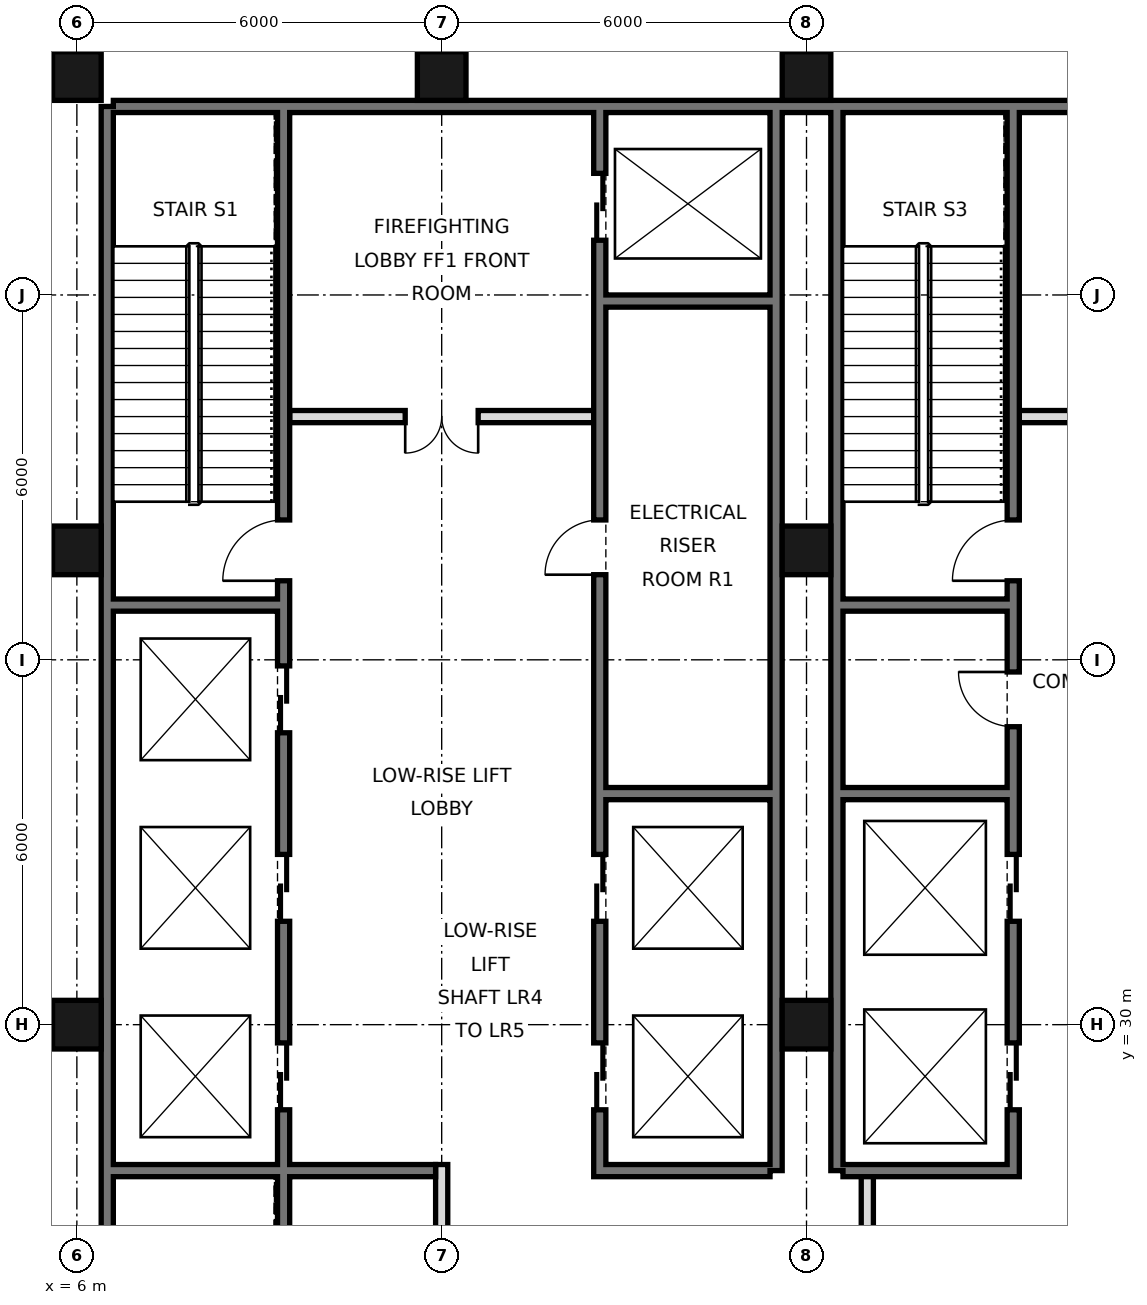
"""IFC4 building model, lengths in metres.
Left out: names, types, materials, properties, quantities, classifications, styles, units other than length and angle.
Written with IfcOpenShell. Run it as: python <this file> out.ifc"""

import sys

from ifc_helpers import new_model, si_unit, direction, frame, frame_2d, origin, origin_2d, place, context, subcontext, project, spatial, rectangle, hollow_rectangle, extrude, element, fill, save


model = new_model("IFC4")
c1 = context("Model", 3, precision=1e-05, world=origin(), true_north=direction((0.0, 1.0)))
c2 = subcontext(c1, "Body", "Model", "MODEL_VIEW")
j1 = project(units=[si_unit("LENGTHUNIT", "METRE"), si_unit("PLANEANGLEUNIT", "RADIAN")], contexts=[c1])
p1 = place(None, origin())
s1 = spatial("IfcSite", under=j1, at=p1, CompositionType="ELEMENT")
p2 = place(p1, origin())
s2 = spatial("IfcBuilding", under=s1, at=p2, CompositionType="ELEMENT")
p3 = place(p2, frame((0.0, 0.0, 161.8)))
s3 = spatial("IfcBuildingStorey", under=s2, at=p3, CompositionType="ELEMENT", Elevation=161.8)
for number, where, z_axis, x_axis in (
    (1, (6.0, 30.0, 0.0), (0.0, 0.0, 1.0), (1.0, 0.0, 0.0)),
    (2, (6.0, 37.8, 0.0), (0.0, 0.0, 1.0), (1.0, 0.0, 0.0)),
    (3, (6.0, 45.6, 0.0), (0.0, 0.0, 1.0), (1.0, 0.0, 0.0)),
    (4, (12.0, 45.6, 0.0), (0.0, 0.0, 1.0), (1.0, 0.0, 0.0)),
    (5, (18.0, 30.0, 0.0), (0.0, 0.0, 1.0), (1.0, 0.0, 0.0)),
    (6, (18.0, 37.8, 0.0), (0.0, 0.0, 1.0), (1.0, 0.0, 0.0)),
    (7, (18.0, 45.6, 0.0), (0.0, 0.0, 1.0), (1.0, 0.0, 0.0)),
):
    element("IfcColumn", number, at=place(p3, frame(where, z_axis=z_axis, x_axis=x_axis)), inside=s3, PredefinedType="COLUMN", context=c2, shape_type="SweptSolid", body=[
        extrude(hollow_rectangle(XDim=0.8, YDim=0.8, WallThickness=0.045, at=origin_2d()), origin(), (0.0, 0.0, 1.0), 5.4),
    ])
p4 = place(p3, frame((6.5, 21.6, 0.0), z_axis=(0.0, 0.0, 1.0), x_axis=(0.0, 1.0, 0.0)))
e8 = element("IfcWall", 8, at=p4, inside=s3, PredefinedType="SOLIDWALL", context=c2, shape_type="SweptSolid", body=[
    extrude(rectangle(XDim=23.5, YDim=0.2, at=frame_2d((11.75, 0.0))), origin(), (0.0, 0.0, 1.0), 5.22),
])
p5 = place(p3, frame((6.6, 45.1, 0.0), z_axis=(0.0, 0.0, 1.0), x_axis=(1.0, 0.0, 0.0)))
e9 = element("IfcWall", 9, at=p5, inside=s3, PredefinedType="SOLIDWALL", context=c2, shape_type="SweptSolid", body=[
    extrude(rectangle(XDim=34.8, YDim=0.2, at=frame_2d((17.4, 0.0))), origin(), (0.0, 0.0, 1.0), 5.22),
])
for number, where, z_axis, x_axis in (
    (10, (17.5, 27.6, 0.0), (0.0, 0.0, 1.0), (0.0, 1.0, 0.0)),
    (11, (18.5, 27.6, 0.0), (0.0, 0.0, 1.0), (0.0, 1.0, 0.0)),
):
    element("IfcWall", number, at=place(p3, frame(where, z_axis=z_axis, x_axis=x_axis)), inside=s3, PredefinedType="SOLIDWALL", context=c2, shape_type="SweptSolid", body=[
        extrude(rectangle(XDim=17.5, YDim=0.2, at=frame_2d((8.75, 0.0))), origin(), (0.0, 0.0, 1.0), 5.22),
    ])
p6 = place(p3, frame((19.0, 21.6, 0.0), z_axis=(0.0, 0.0, 1.0), x_axis=(0.0, 1.0, 0.0)))
e12 = element("IfcWall", 12, at=p6, inside=s3, PredefinedType="PARTITIONING", context=c2, shape_type="SweptSolid", body=[
    extrude(rectangle(XDim=6.0, YDim=0.2, at=frame_2d((3.0, 0.0))), origin(), (0.0, 0.0, 1.0), 5.22),
])
p7 = place(p6, frame((2.1, 0.0, 0.0)))
e13 = element("IfcOpeningElement", 13, at=p7, cuts=e12, PredefinedType="OPENING", context=c2, shape_type="SweptSolid", body=[
    extrude(rectangle(XDim=1.8, YDim=2.1, at=frame_2d((0.9, 1.05))), frame((0.0, 0.11, 0.0), z_axis=(0.0, -1.0, 0.0), x_axis=(1.0, 0.0, 0.0)), (0.0, 0.0, 1.0), 0.22),
])
p8 = place(p3, frame((12.0, 21.6, 0.0), z_axis=(0.0, 0.0, 1.0), x_axis=(0.0, 1.0, 0.0)))
e14 = element("IfcWall", 14, at=p8, inside=s3, PredefinedType="PARTITIONING", context=c2, shape_type="SweptSolid", body=[
    extrude(rectangle(XDim=6.1, YDim=0.2, at=frame_2d((3.05, 0.0))), origin(), (0.0, 0.0, 1.0), 5.22),
])
p9 = place(p3, frame((14.6, 27.5, 0.0), z_axis=(0.0, 0.0, 1.0), x_axis=(0.0, 1.0, 0.0)))
e15 = element("IfcWall", 15, at=p9, inside=s3, PredefinedType="SOLIDWALL", context=c2, shape_type="SweptSolid", body=[
    extrude(rectangle(XDim=17.5, YDim=0.2, at=frame_2d((8.75, 0.0))), origin(), (0.0, 0.0, 1.0), 5.22),
])
p10 = place(p9, frame((1.1, 0.0, 0.0)))
e16 = element("IfcOpeningElement", 16, at=p10, cuts=e15, PredefinedType="OPENING", context=c2, shape_type="SweptSolid", body=[
    extrude(rectangle(XDim=1.1, YDim=2.1, at=frame_2d((0.55, 1.05))), frame((0.0, 0.11, 0.0), z_axis=(0.0, -1.0, 0.0), x_axis=(1.0, 0.0, 0.0)), (0.0, 0.0, 1.0), 0.22),
])
p11 = place(p9, frame((4.2, 0.0, 0.0)))
e17 = element("IfcOpeningElement", 17, at=p11, cuts=e15, PredefinedType="OPENING", context=c2, shape_type="SweptSolid", body=[
    extrude(rectangle(XDim=1.1, YDim=2.1, at=frame_2d((0.55, 1.05))), frame((0.0, 0.11, 0.0), z_axis=(0.0, -1.0, 0.0), x_axis=(1.0, 0.0, 0.0)), (0.0, 0.0, 1.0), 0.22),
])
p12 = place(p9, frame((15.4, 0.0, 0.0)))
e18 = element("IfcOpeningElement", 18, at=p12, cuts=e15, PredefinedType="OPENING", context=c2, shape_type="SweptSolid", body=[
    extrude(rectangle(XDim=1.1, YDim=2.1, at=frame_2d((0.55, 1.05))), frame((0.0, 0.11, 0.0), z_axis=(0.0, -1.0, 0.0), x_axis=(1.0, 0.0, 0.0)), (0.0, 0.0, 1.0), 0.22),
])
p13 = place(p9, frame((9.9, 0.0, 0.0)))
e19 = element("IfcOpeningElement", 19, at=p13, cuts=e15, PredefinedType="OPENING", context=c2, shape_type="SweptSolid", body=[
    extrude(rectangle(XDim=0.9, YDim=2.1, at=frame_2d((0.45, 1.05))), frame((0.0, 0.11, 0.0), z_axis=(0.0, -1.0, 0.0), x_axis=(1.0, 0.0, 0.0)), (0.0, 0.0, 1.0), 0.22),
])
p14 = place(p3, frame((21.4, 27.5, 0.0), z_axis=(0.0, 0.0, 1.0), x_axis=(0.0, 1.0, 0.0)))
e20 = element("IfcWall", 20, at=p14, inside=s3, PredefinedType="SOLIDWALL", context=c2, shape_type="SweptSolid", body=[
    extrude(rectangle(XDim=17.5, YDim=0.2, at=frame_2d((8.75, 0.0))), origin(), (0.0, 0.0, 1.0), 5.22),
])
p15 = place(p14, frame((1.1, 0.0, 0.0)))
e21 = element("IfcOpeningElement", 21, at=p15, cuts=e20, PredefinedType="OPENING", context=c2, shape_type="SweptSolid", body=[
    extrude(rectangle(XDim=1.1, YDim=2.1, at=frame_2d((0.55, 1.05))), frame((0.0, 0.11, 0.0), z_axis=(0.0, -1.0, 0.0), x_axis=(1.0, 0.0, 0.0)), (0.0, 0.0, 1.0), 0.22),
])
p16 = place(p14, frame((4.2, 0.0, 0.0)))
e22 = element("IfcOpeningElement", 22, at=p16, cuts=e20, PredefinedType="OPENING", context=c2, shape_type="SweptSolid", body=[
    extrude(rectangle(XDim=1.1, YDim=2.1, at=frame_2d((0.55, 1.05))), frame((0.0, 0.11, 0.0), z_axis=(0.0, -1.0, 0.0), x_axis=(1.0, 0.0, 0.0)), (0.0, 0.0, 1.0), 0.22),
])
p17 = place(p14, frame((9.8, 0.0, 0.0)))
e23 = element("IfcOpeningElement", 23, at=p17, cuts=e20, PredefinedType="OPENING", context=c2, shape_type="SweptSolid", body=[
    extrude(rectangle(XDim=1.0, YDim=2.1, at=frame_2d((0.5, 1.05))), frame((0.0, 0.11, 0.0), z_axis=(0.0, -1.0, 0.0), x_axis=(1.0, 0.0, 0.0)), (0.0, 0.0, 1.0), 0.22),
])
p18 = place(p14, frame((7.4, 0.0, 0.0)))
e24 = element("IfcOpeningElement", 24, at=p18, cuts=e20, PredefinedType="OPENING", context=c2, shape_type="SweptSolid", body=[
    extrude(rectangle(XDim=0.9, YDim=2.1, at=frame_2d((0.45, 1.05))), frame((0.0, 0.11, 0.0), z_axis=(0.0, -1.0, 0.0), x_axis=(1.0, 0.0, 0.0)), (0.0, 0.0, 1.0), 0.22),
])
p19 = place(p3, frame((9.4, 21.6, 0.0), z_axis=(0.0, 0.0, 1.0), x_axis=(0.0, 1.0, 0.0)))
e25 = element("IfcWall", 25, at=p19, inside=s3, PredefinedType="SOLIDWALL", context=c2, shape_type="SweptSolid", body=[
    extrude(rectangle(XDim=23.4, YDim=0.2, at=frame_2d((11.7, 0.0))), origin(), (0.0, 0.0, 1.0), 5.22),
])
p20 = place(p19, frame((7.0, 0.0, 0.0)))
e26 = element("IfcOpeningElement", 26, at=p20, cuts=e25, PredefinedType="OPENING", context=c2, shape_type="SweptSolid", body=[
    extrude(rectangle(XDim=1.1, YDim=2.1, at=frame_2d((0.55, 1.05))), frame((0.0, 0.11, 0.0), z_axis=(0.0, -1.0, 0.0), x_axis=(1.0, 0.0, 0.0)), (0.0, 0.0, 1.0), 0.22),
])
p21 = place(p19, frame((10.1, 0.0, 0.0)))
e27 = element("IfcOpeningElement", 27, at=p21, cuts=e25, PredefinedType="OPENING", context=c2, shape_type="SweptSolid", body=[
    extrude(rectangle(XDim=1.1, YDim=2.1, at=frame_2d((0.55, 1.05))), frame((0.0, 0.11, 0.0), z_axis=(0.0, -1.0, 0.0), x_axis=(1.0, 0.0, 0.0)), (0.0, 0.0, 1.0), 0.22),
])
p22 = place(p19, frame((13.2, 0.0, 0.0)))
e28 = element("IfcOpeningElement", 28, at=p22, cuts=e25, PredefinedType="OPENING", context=c2, shape_type="SweptSolid", body=[
    extrude(rectangle(XDim=1.1, YDim=2.1, at=frame_2d((0.55, 1.05))), frame((0.0, 0.11, 0.0), z_axis=(0.0, -1.0, 0.0), x_axis=(1.0, 0.0, 0.0)), (0.0, 0.0, 1.0), 0.22),
])
p23 = place(p19, frame((15.7, 0.0, 0.0)))
e29 = element("IfcOpeningElement", 29, at=p23, cuts=e25, PredefinedType="OPENING", context=c2, shape_type="SweptSolid", body=[
    extrude(rectangle(XDim=1.0, YDim=2.1, at=frame_2d((0.5, 1.05))), frame((0.0, 0.11, 0.0), z_axis=(0.0, -1.0, 0.0), x_axis=(1.0, 0.0, 0.0)), (0.0, 0.0, 1.0), 0.22),
])
p24 = place(p19, frame((0.175, 0.0, 0.0)))
e30 = element("IfcOpeningElement", 30, at=p24, cuts=e25, PredefinedType="OPENING", context=c2, shape_type="SweptSolid", body=[
    extrude(rectangle(XDim=0.9, YDim=2.1, at=frame_2d((0.45, 1.05))), frame((0.0, 0.11, 0.0), z_axis=(0.0, -1.0, 0.0), x_axis=(1.0, 0.0, 0.0)), (0.0, 0.0, 1.0), 0.22),
])
for number, where, z_axis, x_axis in (
    (31, (14.7, 27.6, 0.0), (0.0, 0.0, 1.0), (1.0, 0.0, 0.0)),
    (32, (18.6, 27.6, 0.0), (0.0, 0.0, 1.0), (1.0, 0.0, 0.0)),
):
    element("IfcWall", number, at=place(p3, frame(where, z_axis=z_axis, x_axis=x_axis)), inside=s3, PredefinedType="SOLIDWALL", context=c2, shape_type="SweptSolid", body=[
        extrude(rectangle(XDim=2.7, YDim=0.2, at=frame_2d((1.35, 0.0))), origin(), (0.0, 0.0, 1.0), 5.22),
    ])
p25 = place(p3, frame((6.6, 27.6, 0.0), z_axis=(0.0, 0.0, 1.0), x_axis=(1.0, 0.0, 0.0)))
e33 = element("IfcWall", 33, at=p25, inside=s3, PredefinedType="SOLIDWALL", context=c2, shape_type="SweptSolid", body=[
    extrude(rectangle(XDim=5.3, YDim=0.2, at=frame_2d((2.65, 0.0))), origin(), (0.0, 0.0, 1.0), 5.22),
])
for number, where, z_axis, x_axis in (
    (34, (14.7, 33.8, 0.0), (0.0, 0.0, 1.0), (1.0, 0.0, 0.0)),
    (35, (18.6, 33.8, 0.0), (0.0, 0.0, 1.0), (1.0, 0.0, 0.0)),
    (36, (18.6, 36.9, 0.0), (0.0, 0.0, 1.0), (1.0, 0.0, 0.0)),
    (37, (6.6, 36.9, 0.0), (0.0, 0.0, 1.0), (1.0, 0.0, 0.0)),
):
    element("IfcWall", number, at=place(p3, frame(where, z_axis=z_axis, x_axis=x_axis)), inside=s3, PredefinedType="SOLIDWALL", context=c2, shape_type="SweptSolid", body=[
        extrude(rectangle(XDim=2.7, YDim=0.2, at=frame_2d((1.35, 0.0))), origin(), (0.0, 0.0, 1.0), 5.22),
    ])
p26 = place(p3, frame((21.5, 40.0, 0.0), z_axis=(0.0, 0.0, 1.0), x_axis=(1.0, 0.0, 0.0)))
e38 = element("IfcWall", 38, at=p26, inside=s3, PredefinedType="PARTITIONING", context=c2, shape_type="SweptSolid", body=[
    extrude(rectangle(XDim=5.0, YDim=0.2, at=frame_2d((2.5, 0.0))), origin(), (0.0, 0.0, 1.0), 5.22),
])
p27 = place(p26, frame((1.9, 0.0, 0.0)))
e39 = element("IfcOpeningElement", 39, at=p27, cuts=e38, PredefinedType="OPENING", context=c2, shape_type="SweptSolid", body=[
    extrude(rectangle(XDim=1.2, YDim=2.1, at=frame_2d((0.6, 1.05))), frame((0.0, 0.11, 0.0), z_axis=(0.0, -1.0, 0.0), x_axis=(1.0, 0.0, 0.0)), (0.0, 0.0, 1.0), 0.22),
])
p28 = place(p3, frame((9.5, 40.0, 0.0), z_axis=(0.0, 0.0, 1.0), x_axis=(1.0, 0.0, 0.0)))
e40 = element("IfcWall", 40, at=p28, inside=s3, PredefinedType="PARTITIONING", context=c2, shape_type="SweptSolid", body=[
    extrude(rectangle(XDim=5.0, YDim=0.2, at=frame_2d((2.5, 0.0))), origin(), (0.0, 0.0, 1.0), 5.22),
])
p29 = place(p28, frame((1.9, 0.0, 0.0)))
e41 = element("IfcOpeningElement", 41, at=p29, cuts=e40, PredefinedType="OPENING", context=c2, shape_type="SweptSolid", body=[
    extrude(rectangle(XDim=1.2, YDim=2.1, at=frame_2d((0.6, 1.05))), frame((0.0, 0.11, 0.0), z_axis=(0.0, -1.0, 0.0), x_axis=(1.0, 0.0, 0.0)), (0.0, 0.0, 1.0), 0.22),
])
p30 = place(p3, frame((14.7, 41.9, 0.0), z_axis=(0.0, 0.0, 1.0), x_axis=(1.0, 0.0, 0.0)))
e42 = element("IfcWall", 42, at=p30, inside=s3, PredefinedType="SOLIDWALL", context=c2, shape_type="SweptSolid", body=[
    extrude(rectangle(XDim=2.7, YDim=0.2, at=frame_2d((1.35, 0.0))), origin(), (0.0, 0.0, 1.0), 5.22),
])
p31 = place(p29, frame((1.2, 0.0, 0.0), z_axis=(0.0, 0.0, 1.0), x_axis=(-1.0, 0.0, 0.0)))
e43 = element("IfcDoor", 43, at=p31, inside=s3, OperationType="DOUBLE_DOOR_SINGLE_SWING", PredefinedType="DOOR", context=c2, shape_type="SweptSolid", body=[
    extrude(rectangle(XDim=1.2, YDim=2.1, at=frame_2d((0.6, 1.05))), frame((0.0, 0.025, 0.0), z_axis=(0.0, -1.0, 0.0), x_axis=(1.0, 0.0, 0.0)), (0.0, 0.0, 1.0), 0.05),
])
fill(e41, e43)
p32 = place(p15, origin())
e44 = element("IfcDoor", 44, at=p32, inside=s3, OperationType="DOUBLE_DOOR_SLIDING", PredefinedType="DOOR", context=c2, shape_type="SweptSolid", body=[
    extrude(rectangle(XDim=1.1, YDim=2.1, at=frame_2d((0.55, 1.05))), frame((0.0, 0.025, 0.0), z_axis=(0.0, -1.0, 0.0), x_axis=(1.0, 0.0, 0.0)), (0.0, 0.0, 1.0), 0.05),
])
fill(e21, e44)
p33 = place(p16, origin())
e45 = element("IfcDoor", 45, at=p33, inside=s3, OperationType="DOUBLE_DOOR_SLIDING", PredefinedType="DOOR", context=c2, shape_type="SweptSolid", body=[
    extrude(rectangle(XDim=1.1, YDim=2.1, at=frame_2d((0.55, 1.05))), frame((0.0, 0.025, 0.0), z_axis=(0.0, -1.0, 0.0), x_axis=(1.0, 0.0, 0.0)), (0.0, 0.0, 1.0), 0.05),
])
fill(e22, e45)
p34 = place(p10, origin())
e46 = element("IfcDoor", 46, at=p34, inside=s3, OperationType="DOUBLE_DOOR_SLIDING", PredefinedType="DOOR", context=c2, shape_type="SweptSolid", body=[
    extrude(rectangle(XDim=1.1, YDim=2.1, at=frame_2d((0.55, 1.05))), frame((0.0, 0.025, 0.0), z_axis=(0.0, -1.0, 0.0), x_axis=(1.0, 0.0, 0.0)), (0.0, 0.0, 1.0), 0.05),
])
fill(e16, e46)
p35 = place(p11, origin())
e47 = element("IfcDoor", 47, at=p35, inside=s3, OperationType="DOUBLE_DOOR_SLIDING", PredefinedType="DOOR", context=c2, shape_type="SweptSolid", body=[
    extrude(rectangle(XDim=1.1, YDim=2.1, at=frame_2d((0.55, 1.05))), frame((0.0, 0.025, 0.0), z_axis=(0.0, -1.0, 0.0), x_axis=(1.0, 0.0, 0.0)), (0.0, 0.0, 1.0), 0.05),
])
fill(e17, e47)
p36 = place(p12, origin())
e48 = element("IfcDoor", 48, at=p36, inside=s3, OperationType="DOUBLE_DOOR_SLIDING", PredefinedType="DOOR", context=c2, shape_type="SweptSolid", body=[
    extrude(rectangle(XDim=1.1, YDim=2.1, at=frame_2d((0.55, 1.05))), frame((0.0, 0.025, 0.0), z_axis=(0.0, -1.0, 0.0), x_axis=(1.0, 0.0, 0.0)), (0.0, 0.0, 1.0), 0.05),
])
fill(e18, e48)
p37 = place(p20, origin())
e49 = element("IfcDoor", 49, at=p37, inside=s3, OperationType="DOUBLE_DOOR_SLIDING", PredefinedType="DOOR", context=c2, shape_type="SweptSolid", body=[
    extrude(rectangle(XDim=1.1, YDim=2.1, at=frame_2d((0.55, 1.05))), frame((0.0, 0.025, 0.0), z_axis=(0.0, -1.0, 0.0), x_axis=(1.0, 0.0, 0.0)), (0.0, 0.0, 1.0), 0.05),
])
fill(e26, e49)
p38 = place(p21, origin())
e50 = element("IfcDoor", 50, at=p38, inside=s3, OperationType="DOUBLE_DOOR_SLIDING", PredefinedType="DOOR", context=c2, shape_type="SweptSolid", body=[
    extrude(rectangle(XDim=1.1, YDim=2.1, at=frame_2d((0.55, 1.05))), frame((0.0, 0.025, 0.0), z_axis=(0.0, -1.0, 0.0), x_axis=(1.0, 0.0, 0.0)), (0.0, 0.0, 1.0), 0.05),
])
fill(e27, e50)
p39 = place(p22, origin())
e51 = element("IfcDoor", 51, at=p39, inside=s3, OperationType="DOUBLE_DOOR_SLIDING", PredefinedType="DOOR", context=c2, shape_type="SweptSolid", body=[
    extrude(rectangle(XDim=1.1, YDim=2.1, at=frame_2d((0.55, 1.05))), frame((0.0, 0.025, 0.0), z_axis=(0.0, -1.0, 0.0), x_axis=(1.0, 0.0, 0.0)), (0.0, 0.0, 1.0), 0.05),
])
fill(e28, e51)
p40 = place(p23, origin())
e52 = element("IfcDoor", 52, at=p40, inside=s3, OperationType="SINGLE_SWING_LEFT", PredefinedType="DOOR", context=c2, shape_type="SweptSolid", body=[
    extrude(rectangle(XDim=1.0, YDim=2.1, at=frame_2d((0.5, 1.05))), frame((0.0, 0.025, 0.0), z_axis=(0.0, -1.0, 0.0), x_axis=(1.0, 0.0, 0.0)), (0.0, 0.0, 1.0), 0.05),
])
fill(e29, e52)
p41 = place(p17, origin())
e53 = element("IfcDoor", 53, at=p41, inside=s3, OperationType="SINGLE_SWING_LEFT", PredefinedType="DOOR", context=c2, shape_type="SweptSolid", body=[
    extrude(rectangle(XDim=1.0, YDim=2.1, at=frame_2d((0.5, 1.05))), frame((0.0, 0.025, 0.0), z_axis=(0.0, -1.0, 0.0), x_axis=(1.0, 0.0, 0.0)), (0.0, 0.0, 1.0), 0.05),
])
fill(e23, e53)
p42 = place(p13, origin())
e54 = element("IfcDoor", 54, at=p42, inside=s3, OperationType="SINGLE_SWING_LEFT", PredefinedType="DOOR", context=c2, shape_type="SweptSolid", body=[
    extrude(rectangle(XDim=0.9, YDim=2.1, at=frame_2d((0.45, 1.05))), frame((0.0, 0.025, 0.0), z_axis=(0.0, -1.0, 0.0), x_axis=(1.0, 0.0, 0.0)), (0.0, 0.0, 1.0), 0.05),
])
fill(e19, e54)
p43 = place(p18, frame((0.9, 0.0, 0.0), z_axis=(0.0, 0.0, 1.0), x_axis=(-1.0, 0.0, 0.0)))
e55 = element("IfcDoor", 55, at=p43, inside=s3, OperationType="SINGLE_SWING_LEFT", PredefinedType="DOOR", context=c2, shape_type="SweptSolid", body=[
    extrude(rectangle(XDim=0.9, YDim=2.1, at=frame_2d((0.45, 1.05))), frame((0.0, 0.025, 0.0), z_axis=(0.0, -1.0, 0.0), x_axis=(1.0, 0.0, 0.0)), (0.0, 0.0, 1.0), 0.05),
])
fill(e24, e55)
save(model, sys.argv[1])
